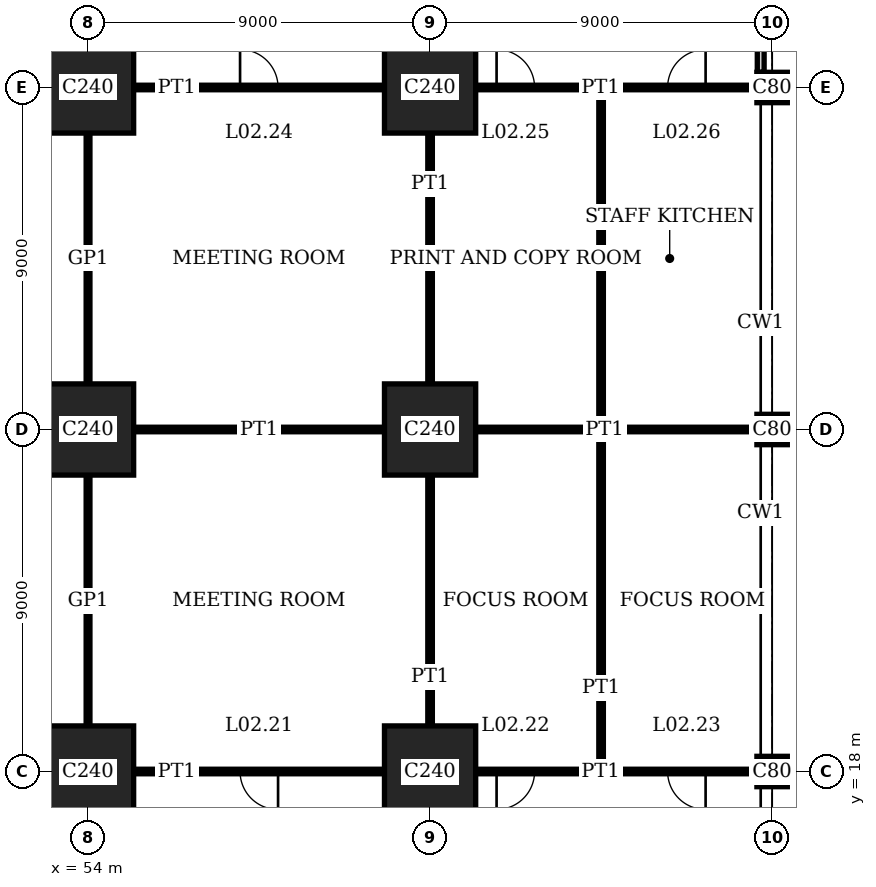
"""IFC4 building model, lengths in metres.
Left out: names, types, materials, properties, quantities, classifications, styles, units other than length and angle.
Written with IfcOpenShell. Run it as: python <this file> out.ifc"""

import sys

from ifc_helpers import new_model, si_unit, direction, frame, frame_2d, origin, origin_2d, place, context, subcontext, project, spatial, rectangle, extrude, element, fill, save


model = new_model("IFC4")
c1 = context("Model", 3, precision=1e-05, world=origin(), true_north=direction((0.0, 1.0)))
c2 = subcontext(c1, "Body", "Model", "MODEL_VIEW")
j1 = project(units=[si_unit("LENGTHUNIT", "METRE"), si_unit("PLANEANGLEUNIT", "RADIAN")], contexts=[c1])
p1 = place(None, origin())
s1 = spatial("IfcSite", under=j1, at=p1, CompositionType="ELEMENT")
p2 = place(p1, origin())
s2 = spatial("IfcBuilding", under=s1, at=p2, CompositionType="ELEMENT")
p3 = place(p2, frame((0.0, 0.0, 10.8)))
s3 = spatial("IfcBuildingStorey", under=s2, at=p3, CompositionType="ELEMENT", Elevation=10.8)
for number, where, z_axis, x_axis in (
    (1, (54.0, 18.0, 0.0), (0.0, 0.0, 1.0), (1.0, 0.0, 0.0)),
    (2, (54.0, 27.0, 0.0), (0.0, 0.0, 1.0), (1.0, 0.0, 0.0)),
    (3, (54.0, 36.0, 0.0), (0.0, 0.0, 1.0), (1.0, 0.0, 0.0)),
    (4, (63.0, 18.0, 0.0), (0.0, 0.0, 1.0), (1.0, 0.0, 0.0)),
    (5, (63.0, 27.0, 0.0), (0.0, 0.0, 1.0), (1.0, 0.0, 0.0)),
    (6, (63.0, 36.0, 0.0), (0.0, 0.0, 1.0), (1.0, 0.0, 0.0)),
):
    element("IfcColumn", number, at=place(p3, frame(where, z_axis=z_axis, x_axis=x_axis)), inside=s3, PredefinedType="COLUMN", context=c2, shape_type="SweptSolid", body=[
        extrude(rectangle(XDim=2.4, YDim=2.4, at=origin_2d()), origin(), (0.0, 0.0, 1.0), 5.0),
    ])
for number, where, z_axis, x_axis in (
    (7, (72.0, 18.0, 0.0), (0.0, 0.0, 1.0), (1.0, 0.0, 0.0)),
    (8, (72.0, 27.0, 0.0), (0.0, 0.0, 1.0), (1.0, 0.0, 0.0)),
    (9, (72.0, 36.0, 0.0), (0.0, 0.0, 1.0), (1.0, 0.0, 0.0)),
):
    element("IfcColumn", number, at=place(p3, frame(where, z_axis=z_axis, x_axis=x_axis)), inside=s3, PredefinedType="COLUMN", context=c2, shape_type="SweptSolid", body=[
        extrude(rectangle(XDim=0.8, YDim=0.8, at=origin_2d()), origin(), (0.0, 0.0, 1.0), 5.0),
    ])
p4 = place(p3, frame((71.7, 36.4, 0.0), z_axis=(0.0, 0.0, 1.0), x_axis=(0.0, 1.0, 0.0)))
e10 = element("IfcWall", 10, at=p4, inside=s3, PredefinedType="SOLIDWALL", context=c2, shape_type="SweptSolid", body=[
    extrude(rectangle(XDim=8.2, YDim=0.18, at=frame_2d((4.1, 0.0))), origin(), (0.0, 0.0, 1.0), 3.8),
])
p5 = place(p4, frame((3.35, 0.0, 0.3)))
e11 = element("IfcOpeningElement", 11, at=p5, cuts=e10, PredefinedType="OPENING", context=c2, shape_type="SweptSolid", body=[
    extrude(rectangle(XDim=1.5, YDim=2.4, at=frame_2d((0.75, 1.2))), frame((0.0, 0.1, 0.0), z_axis=(0.0, -1.0, 0.0), x_axis=(1.0, 0.0, 0.0)), (0.0, 0.0, 1.0), 0.2),
])
p6 = place(p3, frame((55.2, 18.0, 0.0), z_axis=(0.0, 0.0, 1.0), x_axis=(1.0, 0.0, 0.0)))
e12 = element("IfcWall", 12, at=p6, inside=s3, PredefinedType="PARTITIONING", context=c2, shape_type="SweptSolid", body=[
    extrude(rectangle(XDim=6.6, YDim=0.12, at=frame_2d((3.3, 0.0))), origin(), (0.0, 0.0, 1.0), 3.8),
])
p7 = place(p6, frame((2.8, 0.0, 0.0)))
e13 = element("IfcOpeningElement", 13, at=p7, cuts=e12, PredefinedType="OPENING", context=c2, shape_type="SweptSolid", body=[
    extrude(rectangle(XDim=1.0, YDim=2.4, at=frame_2d((0.5, 1.2))), frame((0.0, 0.07, 0.0), z_axis=(0.0, -1.0, 0.0), x_axis=(1.0, 0.0, 0.0)), (0.0, 0.0, 1.0), 0.14),
])
p8 = place(p3, frame((64.2, 18.0, 0.0), z_axis=(0.0, 0.0, 1.0), x_axis=(1.0, 0.0, 0.0)))
e14 = element("IfcWall", 14, at=p8, inside=s3, PredefinedType="PARTITIONING", context=c2, shape_type="SweptSolid", body=[
    extrude(rectangle(XDim=7.4, YDim=0.12, at=frame_2d((3.7, 0.0))), origin(), (0.0, 0.0, 1.0), 3.8),
])
p9 = place(p8, frame((0.55, 0.0, 0.0)))
e15 = element("IfcOpeningElement", 15, at=p9, cuts=e14, PredefinedType="OPENING", context=c2, shape_type="SweptSolid", body=[
    extrude(rectangle(XDim=1.0, YDim=2.4, at=frame_2d((0.5, 1.2))), frame((0.0, 0.07, 0.0), z_axis=(0.0, -1.0, 0.0), x_axis=(1.0, 0.0, 0.0)), (0.0, 0.0, 1.0), 0.14),
])
p10 = place(p8, frame((5.05, 0.0, 0.0)))
e16 = element("IfcOpeningElement", 16, at=p10, cuts=e14, PredefinedType="OPENING", context=c2, shape_type="SweptSolid", body=[
    extrude(rectangle(XDim=1.0, YDim=2.4, at=frame_2d((0.5, 1.2))), frame((0.0, 0.07, 0.0), z_axis=(0.0, -1.0, 0.0), x_axis=(1.0, 0.0, 0.0)), (0.0, 0.0, 1.0), 0.14),
])
p11 = place(p3, frame((55.2, 36.0, 0.0), z_axis=(0.0, 0.0, 1.0), x_axis=(1.0, 0.0, 0.0)))
e17 = element("IfcWall", 17, at=p11, inside=s3, PredefinedType="PARTITIONING", context=c2, shape_type="SweptSolid", body=[
    extrude(rectangle(XDim=6.6, YDim=0.12, at=frame_2d((3.3, 0.0))), origin(), (0.0, 0.0, 1.0), 3.8),
])
p12 = place(p11, frame((2.8, 0.0, 0.0)))
e18 = element("IfcOpeningElement", 18, at=p12, cuts=e17, PredefinedType="OPENING", context=c2, shape_type="SweptSolid", body=[
    extrude(rectangle(XDim=1.0, YDim=2.4, at=frame_2d((0.5, 1.2))), frame((0.0, 0.07, 0.0), z_axis=(0.0, -1.0, 0.0), x_axis=(1.0, 0.0, 0.0)), (0.0, 0.0, 1.0), 0.14),
])
p13 = place(p3, frame((64.2, 36.0, 0.0), z_axis=(0.0, 0.0, 1.0), x_axis=(1.0, 0.0, 0.0)))
e19 = element("IfcWall", 19, at=p13, inside=s3, PredefinedType="PARTITIONING", context=c2, shape_type="SweptSolid", body=[
    extrude(rectangle(XDim=7.4, YDim=0.12, at=frame_2d((3.7, 0.0))), origin(), (0.0, 0.0, 1.0), 3.8),
])
p14 = place(p13, frame((0.55, 0.0, 0.0)))
e20 = element("IfcOpeningElement", 20, at=p14, cuts=e19, PredefinedType="OPENING", context=c2, shape_type="SweptSolid", body=[
    extrude(rectangle(XDim=1.0, YDim=2.4, at=frame_2d((0.5, 1.2))), frame((0.0, 0.07, 0.0), z_axis=(0.0, -1.0, 0.0), x_axis=(1.0, 0.0, 0.0)), (0.0, 0.0, 1.0), 0.14),
])
p15 = place(p13, frame((5.05, 0.0, 0.0)))
e21 = element("IfcOpeningElement", 21, at=p15, cuts=e19, PredefinedType="OPENING", context=c2, shape_type="SweptSolid", body=[
    extrude(rectangle(XDim=1.0, YDim=2.4, at=frame_2d((0.5, 1.2))), frame((0.0, 0.07, 0.0), z_axis=(0.0, -1.0, 0.0), x_axis=(1.0, 0.0, 0.0)), (0.0, 0.0, 1.0), 0.14),
])
for number, where, z_axis, x_axis in (
    (22, (54.0, 19.2, 0.0), (0.0, 0.0, 1.0), (0.0, 1.0, 0.0)),
    (23, (54.0, 28.2, 0.0), (0.0, 0.0, 1.0), (0.0, 1.0, 0.0)),
):
    element("IfcWall", number, at=place(p3, frame(where, z_axis=z_axis, x_axis=x_axis)), inside=s3, PredefinedType="PARTITIONING", context=c2, shape_type="SweptSolid", body=[
        extrude(rectangle(XDim=6.6, YDim=0.1, at=frame_2d((3.3, 0.0))), origin(), (0.0, 0.0, 1.0), 3.8),
    ])
p16 = place(p3, frame((55.2, 27.0, 0.0), z_axis=(0.0, 0.0, 1.0), x_axis=(1.0, 0.0, 0.0)))
e24 = element("IfcWall", 24, at=p16, inside=s3, PredefinedType="PARTITIONING", context=c2, shape_type="SweptSolid", body=[
    extrude(rectangle(XDim=6.6, YDim=0.12, at=frame_2d((3.3, 0.0))), origin(), (0.0, 0.0, 1.0), 3.8),
])
p17 = place(p3, frame((64.2, 27.0, 0.0), z_axis=(0.0, 0.0, 1.0), x_axis=(1.0, 0.0, 0.0)))
e25 = element("IfcWall", 25, at=p17, inside=s3, PredefinedType="PARTITIONING", context=c2, shape_type="SweptSolid", body=[
    extrude(rectangle(XDim=7.4, YDim=0.12, at=frame_2d((3.7, 0.0))), origin(), (0.0, 0.0, 1.0), 3.8),
])
for number, where, z_axis, x_axis in (
    (26, (63.0, 19.2, 0.0), (0.0, 0.0, 1.0), (0.0, 1.0, 0.0)),
    (27, (63.0, 28.2, 0.0), (0.0, 0.0, 1.0), (0.0, 1.0, 0.0)),
):
    element("IfcWall", number, at=place(p3, frame(where, z_axis=z_axis, x_axis=x_axis)), inside=s3, PredefinedType="PARTITIONING", context=c2, shape_type="SweptSolid", body=[
        extrude(rectangle(XDim=6.6, YDim=0.12, at=frame_2d((3.3, 0.0))), origin(), (0.0, 0.0, 1.0), 3.8),
    ])
p18 = place(p3, frame((67.5, 18.0, 0.0), z_axis=(0.0, 0.0, 1.0), x_axis=(0.0, 1.0, 0.0)))
e28 = element("IfcWall", 28, at=p18, inside=s3, PredefinedType="PARTITIONING", context=c2, shape_type="SweptSolid", body=[
    extrude(rectangle(XDim=18.0, YDim=0.12, at=frame_2d((9.0, 0.0))), origin(), (0.0, 0.0, 1.0), 4.6),
])
p19 = place(p7, origin())
e29 = element("IfcDoor", 29, at=p19, inside=s3, OperationType="SINGLE_SWING_RIGHT", PredefinedType="DOOR", context=c2, shape_type="SweptSolid", body=[
    extrude(rectangle(XDim=1.0, YDim=2.4, at=frame_2d((0.5, 1.2))), frame((0.0, 0.025, 0.0), z_axis=(0.0, -1.0, 0.0), x_axis=(1.0, 0.0, 0.0)), (0.0, 0.0, 1.0), 0.05),
])
fill(e13, e29)
p20 = place(p9, origin())
e30 = element("IfcDoor", 30, at=p20, inside=s3, OperationType="SINGLE_SWING_LEFT", PredefinedType="DOOR", context=c2, shape_type="SweptSolid", body=[
    extrude(rectangle(XDim=1.0, YDim=2.4, at=frame_2d((0.5, 1.2))), frame((0.0, 0.025, 0.0), z_axis=(0.0, -1.0, 0.0), x_axis=(1.0, 0.0, 0.0)), (0.0, 0.0, 1.0), 0.05),
])
fill(e15, e30)
p21 = place(p10, origin())
e31 = element("IfcDoor", 31, at=p21, inside=s3, OperationType="SINGLE_SWING_RIGHT", PredefinedType="DOOR", context=c2, shape_type="SweptSolid", body=[
    extrude(rectangle(XDim=1.0, YDim=2.4, at=frame_2d((0.5, 1.2))), frame((0.0, 0.025, 0.0), z_axis=(0.0, -1.0, 0.0), x_axis=(1.0, 0.0, 0.0)), (0.0, 0.0, 1.0), 0.05),
])
fill(e16, e31)
p22 = place(p12, origin())
e32 = element("IfcDoor", 32, at=p22, inside=s3, OperationType="SINGLE_SWING_RIGHT", PredefinedType="DOOR", context=c2, shape_type="SweptSolid", body=[
    extrude(rectangle(XDim=1.0, YDim=2.4, at=frame_2d((0.5, 1.2))), frame((0.0, 0.025, 0.0), z_axis=(0.0, -1.0, 0.0), x_axis=(1.0, 0.0, 0.0)), (0.0, 0.0, 1.0), 0.05),
])
fill(e18, e32)
p23 = place(p14, origin())
e33 = element("IfcDoor", 33, at=p23, inside=s3, OperationType="SINGLE_SWING_RIGHT", PredefinedType="DOOR", context=c2, shape_type="SweptSolid", body=[
    extrude(rectangle(XDim=1.0, YDim=2.4, at=frame_2d((0.5, 1.2))), frame((0.0, 0.025, 0.0), z_axis=(0.0, -1.0, 0.0), x_axis=(1.0, 0.0, 0.0)), (0.0, 0.0, 1.0), 0.05),
])
fill(e20, e33)
p24 = place(p15, origin())
e34 = element("IfcDoor", 34, at=p24, inside=s3, OperationType="SINGLE_SWING_LEFT", PredefinedType="DOOR", context=c2, shape_type="SweptSolid", body=[
    extrude(rectangle(XDim=1.0, YDim=2.4, at=frame_2d((0.5, 1.2))), frame((0.0, 0.025, 0.0), z_axis=(0.0, -1.0, 0.0), x_axis=(1.0, 0.0, 0.0)), (0.0, 0.0, 1.0), 0.05),
])
fill(e21, e34)
save(model, sys.argv[1])
